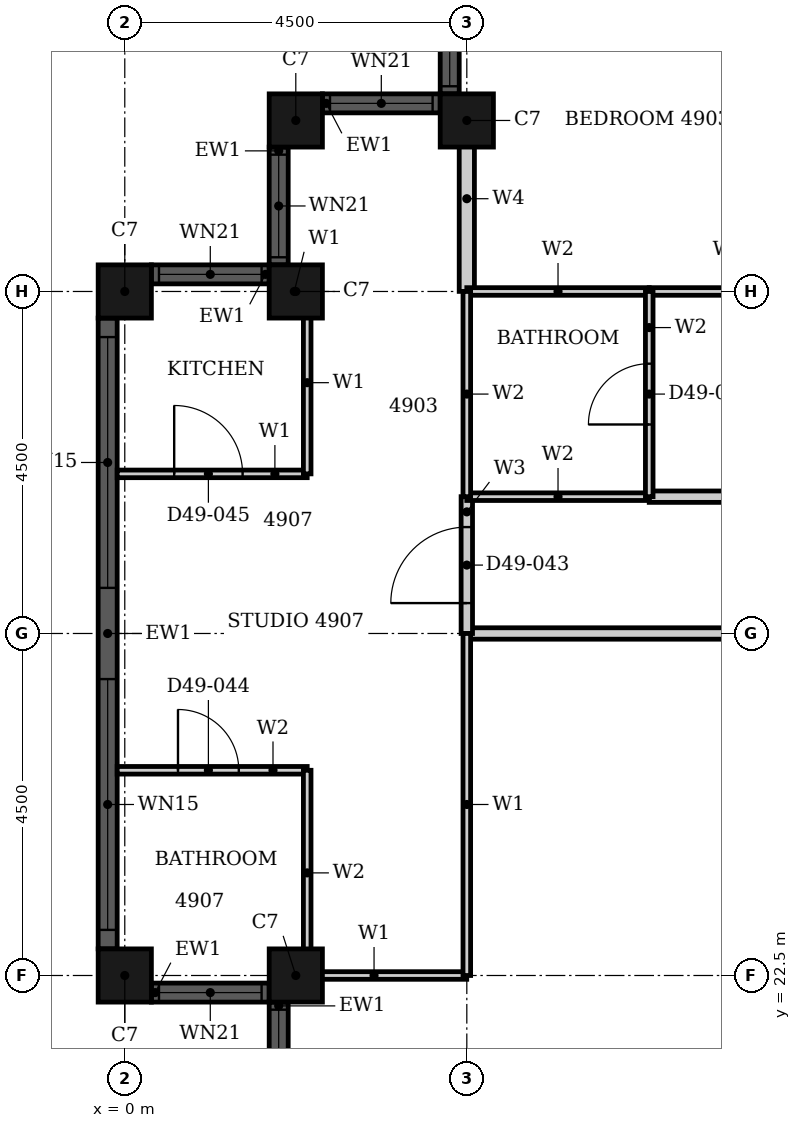
"""IFC4 building model, lengths in metres.
Left out: names, types, materials, properties, quantities, classifications, styles, units other than length and angle.
Written with IfcOpenShell. Run it as: python <this file> out.ifc"""

import sys

from ifc_helpers import new_model, si_unit, direction, frame, frame_2d, origin, origin_2d, place, context, subcontext, project, spatial, rectangle, hollow_rectangle, extrude, element, fill, save


model = new_model("IFC4")
c1 = context("Model", 3, precision=1e-05, world=origin(), true_north=direction((0.0, 1.0)))
c2 = subcontext(c1, "Body", "Model", "MODEL_VIEW")
j1 = project(units=[si_unit("LENGTHUNIT", "METRE"), si_unit("PLANEANGLEUNIT", "RADIAN")], contexts=[c1])
p1 = place(None, origin())
s1 = spatial("IfcSite", under=j1, at=p1, CompositionType="ELEMENT")
p2 = place(p1, origin())
s2 = spatial("IfcBuilding", under=s1, at=p2, CompositionType="ELEMENT")
p3 = place(p2, frame((0.0, 0.0, 196.1)))
s3 = spatial("IfcBuildingStorey", under=s2, at=p3, CompositionType="ELEMENT", Elevation=196.1)
for number, where, z_axis, x_axis in (
    (1, (4.5, 33.75, 0.0), (0.0, 0.0, 1.0), (1.0, 0.0, 0.0)),
    (2, (2.25, 33.75, 0.0), (0.0, 0.0, 1.0), (1.0, 0.0, 0.0)),
    (3, (2.25, 31.5, 0.0), (0.0, 0.0, 1.0), (1.0, 0.0, 0.0)),
    (4, (0.0, 31.5, 0.0), (0.0, 0.0, 1.0), (1.0, 0.0, 0.0)),
    (5, (0.0, 22.5, 0.0), (0.0, 0.0, 1.0), (1.0, 0.0, 0.0)),
    (6, (2.25, 22.5, 0.0), (0.0, 0.0, 1.0), (1.0, 0.0, 0.0)),
):
    element("IfcColumn", number, at=place(p3, frame(where, z_axis=z_axis, x_axis=x_axis)), inside=s3, PredefinedType="COLUMN", context=c2, shape_type="SweptSolid", body=[
        extrude(hollow_rectangle(XDim=0.7, YDim=0.7, WallThickness=0.022, at=origin_2d()), origin(), (0.0, 0.0, 1.0), 3.7),
    ])
p4 = place(p3, frame((4.275, 35.65, 0.0), z_axis=(0.0, 0.0, 1.0), x_axis=(0.0, -1.0, 0.0)))
e7 = element("IfcWall", 7, at=p4, inside=s3, PredefinedType="SOLIDWALL", context=c2, shape_type="SweptSolid", body=[
    extrude(rectangle(XDim=1.55, YDim=0.25, at=frame_2d((0.775, 0.0))), origin(), (0.0, 0.0, 1.0), 3.7),
])
p5 = place(p4, frame((0.1, 0.0, 0.9)))
e8 = element("IfcOpeningElement", 8, at=p5, cuts=e7, PredefinedType="OPENING", context=c2, shape_type="SweptSolid", body=[
    extrude(rectangle(XDim=1.35, YDim=1.85, at=frame_2d((0.675, 0.925))), frame((0.0, 0.135, 0.0), z_axis=(0.0, -1.0, 0.0), x_axis=(1.0, 0.0, 0.0)), (0.0, 0.0, 1.0), 0.27),
])
p6 = place(p3, frame((4.15, 33.975, 0.0), z_axis=(0.0, 0.0, 1.0), x_axis=(-1.0, 0.0, 0.0)))
e9 = element("IfcWall", 9, at=p6, inside=s3, PredefinedType="SOLIDWALL", context=c2, shape_type="SweptSolid", body=[
    extrude(rectangle(XDim=1.55, YDim=0.25, at=frame_2d((0.775, 0.0))), origin(), (0.0, 0.0, 1.0), 3.7),
])
p7 = place(p6, frame((0.1, 0.0, 0.9)))
e10 = element("IfcOpeningElement", 10, at=p7, cuts=e9, PredefinedType="OPENING", context=c2, shape_type="SweptSolid", body=[
    extrude(rectangle(XDim=1.35, YDim=1.85, at=frame_2d((0.675, 0.925))), frame((0.0, 0.135, 0.0), z_axis=(0.0, -1.0, 0.0), x_axis=(1.0, 0.0, 0.0)), (0.0, 0.0, 1.0), 0.27),
])
p8 = place(p3, frame((2.025, 33.4, 0.0), z_axis=(0.0, 0.0, 1.0), x_axis=(0.0, -1.0, 0.0)))
e11 = element("IfcWall", 11, at=p8, inside=s3, PredefinedType="SOLIDWALL", context=c2, shape_type="SweptSolid", body=[
    extrude(rectangle(XDim=1.55, YDim=0.25, at=frame_2d((0.775, 0.0))), origin(), (0.0, 0.0, 1.0), 3.7),
])
p9 = place(p8, frame((0.1, 0.0, 0.9)))
e12 = element("IfcOpeningElement", 12, at=p9, cuts=e11, PredefinedType="OPENING", context=c2, shape_type="SweptSolid", body=[
    extrude(rectangle(XDim=1.35, YDim=1.85, at=frame_2d((0.675, 0.925))), frame((0.0, 0.135, 0.0), z_axis=(0.0, -1.0, 0.0), x_axis=(1.0, 0.0, 0.0)), (0.0, 0.0, 1.0), 0.27),
])
p10 = place(p3, frame((1.9, 31.725, 0.0), z_axis=(0.0, 0.0, 1.0), x_axis=(-1.0, 0.0, 0.0)))
e13 = element("IfcWall", 13, at=p10, inside=s3, PredefinedType="SOLIDWALL", context=c2, shape_type="SweptSolid", body=[
    extrude(rectangle(XDim=1.55, YDim=0.25, at=frame_2d((0.775, 0.0))), origin(), (0.0, 0.0, 1.0), 3.7),
])
p11 = place(p10, frame((0.1, 0.0, 0.9)))
e14 = element("IfcOpeningElement", 14, at=p11, cuts=e13, PredefinedType="OPENING", context=c2, shape_type="SweptSolid", body=[
    extrude(rectangle(XDim=1.35, YDim=1.85, at=frame_2d((0.675, 0.925))), frame((0.0, 0.135, 0.0), z_axis=(0.0, -1.0, 0.0), x_axis=(1.0, 0.0, 0.0)), (0.0, 0.0, 1.0), 0.27),
])
p12 = place(p3, frame((-0.225, 31.15, 0.0), z_axis=(0.0, 0.0, 1.0), x_axis=(0.0, -1.0, 0.0)))
e15 = element("IfcWall", 15, at=p12, inside=s3, PredefinedType="SOLIDWALL", context=c2, shape_type="SweptSolid", body=[
    extrude(rectangle(XDim=8.3, YDim=0.25, at=frame_2d((4.15, 0.0))), origin(), (0.0, 0.0, 1.0), 3.7),
])
p13 = place(p12, frame((0.25, 0.0, 0.45)))
e16 = element("IfcOpeningElement", 16, at=p13, cuts=e15, PredefinedType="OPENING", context=c2, shape_type="SweptSolid", body=[
    extrude(rectangle(XDim=3.3, YDim=2.3, at=frame_2d((1.65, 1.15))), frame((0.0, 0.135, 0.0), z_axis=(0.0, -1.0, 0.0), x_axis=(1.0, 0.0, 0.0)), (0.0, 0.0, 1.0), 0.27),
])
p14 = place(p12, frame((4.75, 0.0, 0.45)))
e17 = element("IfcOpeningElement", 17, at=p14, cuts=e15, PredefinedType="OPENING", context=c2, shape_type="SweptSolid", body=[
    extrude(rectangle(XDim=3.3, YDim=2.3, at=frame_2d((1.65, 1.15))), frame((0.0, 0.135, 0.0), z_axis=(0.0, -1.0, 0.0), x_axis=(1.0, 0.0, 0.0)), (0.0, 0.0, 1.0), 0.27),
])
p15 = place(p3, frame((0.35, 22.275, 0.0), z_axis=(0.0, 0.0, 1.0), x_axis=(1.0, 0.0, 0.0)))
e18 = element("IfcWall", 18, at=p15, inside=s3, PredefinedType="SOLIDWALL", context=c2, shape_type="SweptSolid", body=[
    extrude(rectangle(XDim=1.55, YDim=0.25, at=frame_2d((0.775, 0.0))), origin(), (0.0, 0.0, 1.0), 3.7),
])
p16 = place(p15, frame((0.1, 0.0, 0.9)))
e19 = element("IfcOpeningElement", 19, at=p16, cuts=e18, PredefinedType="OPENING", context=c2, shape_type="SweptSolid", body=[
    extrude(rectangle(XDim=1.35, YDim=1.85, at=frame_2d((0.675, 0.925))), frame((0.0, 0.135, 0.0), z_axis=(0.0, -1.0, 0.0), x_axis=(1.0, 0.0, 0.0)), (0.0, 0.0, 1.0), 0.27),
])
p17 = place(p3, frame((2.025, 22.15, 0.0), z_axis=(0.0, 0.0, 1.0), x_axis=(0.0, -1.0, 0.0)))
e20 = element("IfcWall", 20, at=p17, inside=s3, PredefinedType="SOLIDWALL", context=c2, shape_type="SweptSolid", body=[
    extrude(rectangle(XDim=1.55, YDim=0.25, at=frame_2d((0.775, 0.0))), origin(), (0.0, 0.0, 1.0), 3.7),
])
p18 = place(p17, frame((0.1, 0.0, 0.9)))
e21 = element("IfcOpeningElement", 21, at=p18, cuts=e20, PredefinedType="OPENING", context=c2, shape_type="SweptSolid", body=[
    extrude(rectangle(XDim=1.35, YDim=1.85, at=frame_2d((0.675, 0.925))), frame((0.0, 0.135, 0.0), z_axis=(0.0, -1.0, 0.0), x_axis=(1.0, 0.0, 0.0)), (0.0, 0.0, 1.0), 0.27),
])
p19 = place(p3, frame((4.5, 27.0, 0.0), z_axis=(0.0, 0.0, 1.0), x_axis=(1.0, 0.0, 0.0)))
e22 = element("IfcWall", 22, at=p19, inside=s3, PredefinedType="PARTITIONING", context=c2, shape_type="SweptSolid", body=[
    extrude(rectangle(XDim=13.5, YDim=0.15, at=frame_2d((6.75, 0.0))), origin(), (0.0, 0.0, 1.0), 2.68),
])
p20 = place(p19, frame((5.35, 0.0, 0.0)))
e23 = element("IfcOpeningElement", 23, at=p20, cuts=e22, PredefinedType="OPENING", context=c2, shape_type="SweptSolid", body=[
    extrude(rectangle(XDim=1.0, YDim=2.1, at=frame_2d((0.5, 1.05))), frame((0.0, 0.085, 0.0), z_axis=(0.0, -1.0, 0.0), x_axis=(1.0, 0.0, 0.0)), (0.0, 0.0, 1.0), 0.17),
])
p21 = place(p3, frame((6.9, 28.8, 0.0), z_axis=(0.0, 0.0, 1.0), x_axis=(1.0, 0.0, 0.0)))
e24 = element("IfcWall", 24, at=p21, inside=s3, PredefinedType="PARTITIONING", context=c2, shape_type="SweptSolid", body=[
    extrude(rectangle(XDim=9.299, YDim=0.15, at=frame_2d((4.649, 0.0))), origin(), (0.0, 0.0, 1.0), 3.4),
])
p22 = place(p21, frame((1.3, 0.0, 0.0)))
e25 = element("IfcOpeningElement", 25, at=p22, cuts=e24, PredefinedType="OPENING", context=c2, shape_type="SweptSolid", body=[
    extrude(rectangle(XDim=1.0, YDim=2.2, at=frame_2d((0.5, 1.1))), frame((0.0, 0.085, 0.0), z_axis=(0.0, -1.0, 0.0), x_axis=(1.0, 0.0, 0.0)), (0.0, 0.0, 1.0), 0.17),
])
p23 = place(p3, frame((4.5, 27.0, 0.0), z_axis=(0.0, 0.0, 1.0), x_axis=(0.0, 1.0, 0.0)))
e26 = element("IfcWall", 26, at=p23, inside=s3, PredefinedType="PARTITIONING", context=c2, shape_type="SweptSolid", body=[
    extrude(rectangle(XDim=1.8, YDim=0.15, at=frame_2d((0.9, 0.0))), origin(), (0.0, 0.0, 1.0), 3.4),
])
p24 = place(p23, frame((0.4, 0.0, 0.0)))
e27 = element("IfcOpeningElement", 27, at=p24, cuts=e26, PredefinedType="OPENING", context=c2, shape_type="SweptSolid", body=[
    extrude(rectangle(XDim=1.0, YDim=2.2, at=frame_2d((0.5, 1.1))), frame((0.0, 0.085, 0.0), z_axis=(0.0, -1.0, 0.0), x_axis=(1.0, 0.0, 0.0)), (0.0, 0.0, 1.0), 0.17),
])
p25 = place(p3, frame((2.06, 22.5, 0.0), z_axis=(0.0, 0.0, 1.0), x_axis=(1.0, 0.0, 0.0)))
e28 = element("IfcWall", 28, at=p25, inside=s3, PredefinedType="PARTITIONING", context=c2, shape_type="SweptSolid", body=[
    extrude(rectangle(XDim=2.439, YDim=0.1, at=frame_2d((1.219, 0.0))), origin(), (0.0, 0.0, 1.0), 2.68),
])
p26 = place(p3, frame((-0.1, 29.1, 0.0), z_axis=(0.0, 0.0, 1.0), x_axis=(1.0, 0.0, 0.0)))
e29 = element("IfcWall", 29, at=p26, inside=s3, PredefinedType="PARTITIONING", context=c2, shape_type="SweptSolid", body=[
    extrude(rectangle(XDim=2.5, YDim=0.1, at=frame_2d((1.25, 0.0))), origin(), (0.0, 0.0, 1.0), 3.4),
])
p27 = place(p26, frame((0.75, 0.0, 0.0)))
e30 = element("IfcOpeningElement", 30, at=p27, cuts=e29, PredefinedType="OPENING", context=c2, shape_type="SweptSolid", body=[
    extrude(rectangle(XDim=0.9, YDim=2.1, at=frame_2d((0.45, 1.05))), frame((0.0, 0.06, 0.0), z_axis=(0.0, -1.0, 0.0), x_axis=(1.0, 0.0, 0.0)), (0.0, 0.0, 1.0), 0.12),
])
p28 = place(p3, frame((6.9, 31.5, 0.0), z_axis=(0.0, 0.0, 1.0), x_axis=(1.0, 0.0, 0.0)))
e31 = element("IfcWall", 31, at=p28, inside=s3, PredefinedType="PARTITIONING", context=c2, shape_type="SweptSolid", body=[
    extrude(rectangle(XDim=2.1, YDim=0.1, at=frame_2d((1.05, 0.0))), origin(), (0.0, 0.0, 1.0), 2.68),
])
p29 = place(p3, frame((2.06, 31.5, 0.0), z_axis=(0.0, 0.0, 1.0), x_axis=(1.0, 0.0, 0.0)))
e32 = element("IfcWall", 32, at=p29, inside=s3, PredefinedType="PARTITIONING", context=c2, shape_type="SweptSolid", body=[
    extrude(rectangle(XDim=0.34, YDim=0.1, at=frame_2d((0.17, 0.0))), origin(), (0.0, 0.0, 1.0), 3.4),
])
p30 = place(p3, frame((2.4, 29.1, 0.0), z_axis=(0.0, 0.0, 1.0), x_axis=(0.0, 1.0, 0.0)))
e33 = element("IfcWall", 33, at=p30, inside=s3, PredefinedType="PARTITIONING", context=c2, shape_type="SweptSolid", body=[
    extrude(rectangle(XDim=2.4, YDim=0.1, at=frame_2d((1.2, 0.0))), origin(), (0.0, 0.0, 1.0), 3.4),
])
p31 = place(p3, frame((4.5, 22.5, 0.0), z_axis=(0.0, 0.0, 1.0), x_axis=(0.0, 1.0, 0.0)))
e34 = element("IfcWall", 34, at=p31, inside=s3, PredefinedType="PARTITIONING", context=c2, shape_type="SweptSolid", body=[
    extrude(rectangle(XDim=4.5, YDim=0.1, at=frame_2d((2.25, 0.0))), origin(), (0.0, 0.0, 1.0), 3.4),
])
p32 = place(p3, frame((4.5, 31.501, 0.0), z_axis=(0.0, 0.0, 1.0), x_axis=(0.0, 1.0, 0.0)))
e35 = element("IfcWall", 35, at=p32, inside=s3, PredefinedType="PARTITIONING", context=c2, shape_type="SweptSolid", body=[
    extrude(rectangle(XDim=2.439, YDim=0.2, at=frame_2d((1.219, 0.0))), origin(), (0.0, 0.0, 1.0), 3.4),
])
p33 = place(p3, frame((-0.1, 25.2, 0.0), z_axis=(0.0, 0.0, 1.0), x_axis=(1.0, 0.0, 0.0)))
e36 = element("IfcWall", 36, at=p33, inside=s3, PredefinedType="PARTITIONING", context=c2, shape_type="SweptSolid", body=[
    extrude(rectangle(XDim=2.5, YDim=0.1, at=frame_2d((1.25, 0.0))), origin(), (0.0, 0.0, 1.0), 3.4),
])
p34 = place(p33, frame((0.8, 0.0, 0.0)))
e37 = element("IfcOpeningElement", 37, at=p34, cuts=e36, PredefinedType="OPENING", context=c2, shape_type="SweptSolid", body=[
    extrude(rectangle(XDim=0.8, YDim=2.1, at=frame_2d((0.4, 1.05))), frame((0.0, 0.06, 0.0), z_axis=(0.0, -1.0, 0.0), x_axis=(1.0, 0.0, 0.0)), (0.0, 0.0, 1.0), 0.12),
])
p35 = place(p3, frame((4.5, 28.8, 0.0), z_axis=(0.0, 0.0, 1.0), x_axis=(1.0, 0.0, 0.0)))
e38 = element("IfcWall", 38, at=p35, inside=s3, PredefinedType="PARTITIONING", context=c2, shape_type="SweptSolid", body=[
    extrude(rectangle(XDim=2.4, YDim=0.1, at=frame_2d((1.2, 0.0))), origin(), (0.0, 0.0, 1.0), 3.4),
])
p36 = place(p3, frame((4.5, 31.5, 0.0), z_axis=(0.0, 0.0, 1.0), x_axis=(1.0, 0.0, 0.0)))
e39 = element("IfcWall", 39, at=p36, inside=s3, PredefinedType="PARTITIONING", context=c2, shape_type="SweptSolid", body=[
    extrude(rectangle(XDim=2.4, YDim=0.1, at=frame_2d((1.2, 0.0))), origin(), (0.0, 0.0, 1.0), 2.68),
])
for number, where, z_axis, x_axis in (
    (40, (2.4, 22.5, 0.0), (0.0, 0.0, 1.0), (0.0, 1.0, 0.0)),
    (41, (4.5, 28.8, 0.0), (0.0, 0.0, 1.0), (0.0, 1.0, 0.0)),
):
    element("IfcWall", number, at=place(p3, frame(where, z_axis=z_axis, x_axis=x_axis)), inside=s3, PredefinedType="PARTITIONING", context=c2, shape_type="SweptSolid", body=[
        extrude(rectangle(XDim=2.7, YDim=0.1, at=frame_2d((1.35, 0.0))), origin(), (0.0, 0.0, 1.0), 3.4),
    ])
p37 = place(p3, frame((6.9, 28.8, 0.0), z_axis=(0.0, 0.0, 1.0), x_axis=(0.0, 1.0, 0.0)))
e42 = element("IfcWall", 42, at=p37, inside=s3, PredefinedType="PARTITIONING", context=c2, shape_type="SweptSolid", body=[
    extrude(rectangle(XDim=2.7, YDim=0.1, at=frame_2d((1.35, 0.0))), origin(), (0.0, 0.0, 1.0), 3.4),
])
p38 = place(p37, frame((0.95, 0.0, 0.0)))
e43 = element("IfcOpeningElement", 43, at=p38, cuts=e42, PredefinedType="OPENING", context=c2, shape_type="SweptSolid", body=[
    extrude(rectangle(XDim=0.8, YDim=2.1, at=frame_2d((0.4, 1.05))), frame((0.0, 0.06, 0.0), z_axis=(0.0, -1.0, 0.0), x_axis=(1.0, 0.0, 0.0)), (0.0, 0.0, 1.0), 0.12),
])
p39 = place(p5, origin())
e44 = element("IfcWindow", 44, at=p39, inside=s3, PartitioningType="SINGLE_PANEL", PredefinedType="WINDOW", context=c2, shape_type="SweptSolid", body=[
    extrude(rectangle(XDim=1.35, YDim=1.85, at=frame_2d((0.675, 0.925))), frame((0.0, 0.03, 0.0), z_axis=(0.0, -1.0, 0.0), x_axis=(1.0, 0.0, 0.0)), (0.0, 0.0, 1.0), 0.06),
])
fill(e8, e44)
p40 = place(p7, origin())
e45 = element("IfcWindow", 45, at=p40, inside=s3, PartitioningType="SINGLE_PANEL", PredefinedType="WINDOW", context=c2, shape_type="SweptSolid", body=[
    extrude(rectangle(XDim=1.35, YDim=1.85, at=frame_2d((0.675, 0.925))), frame((0.0, 0.03, 0.0), z_axis=(0.0, -1.0, 0.0), x_axis=(1.0, 0.0, 0.0)), (0.0, 0.0, 1.0), 0.06),
])
fill(e10, e45)
p41 = place(p9, origin())
e46 = element("IfcWindow", 46, at=p41, inside=s3, PartitioningType="SINGLE_PANEL", PredefinedType="WINDOW", context=c2, shape_type="SweptSolid", body=[
    extrude(rectangle(XDim=1.35, YDim=1.85, at=frame_2d((0.675, 0.925))), frame((0.0, 0.03, 0.0), z_axis=(0.0, -1.0, 0.0), x_axis=(1.0, 0.0, 0.0)), (0.0, 0.0, 1.0), 0.06),
])
fill(e12, e46)
p42 = place(p11, origin())
e47 = element("IfcWindow", 47, at=p42, inside=s3, PartitioningType="SINGLE_PANEL", PredefinedType="WINDOW", context=c2, shape_type="SweptSolid", body=[
    extrude(rectangle(XDim=1.35, YDim=1.85, at=frame_2d((0.675, 0.925))), frame((0.0, 0.03, 0.0), z_axis=(0.0, -1.0, 0.0), x_axis=(1.0, 0.0, 0.0)), (0.0, 0.0, 1.0), 0.06),
])
fill(e14, e47)
p43 = place(p13, origin())
e48 = element("IfcWindow", 48, at=p43, inside=s3, PartitioningType="SINGLE_PANEL", PredefinedType="WINDOW", context=c2, shape_type="SweptSolid", body=[
    extrude(rectangle(XDim=3.3, YDim=2.3, at=frame_2d((1.65, 1.15))), frame((0.0, 0.03, 0.0), z_axis=(0.0, -1.0, 0.0), x_axis=(1.0, 0.0, 0.0)), (0.0, 0.0, 1.0), 0.06),
])
fill(e16, e48)
p44 = place(p14, origin())
e49 = element("IfcWindow", 49, at=p44, inside=s3, PartitioningType="SINGLE_PANEL", PredefinedType="WINDOW", context=c2, shape_type="SweptSolid", body=[
    extrude(rectangle(XDim=3.3, YDim=2.3, at=frame_2d((1.65, 1.15))), frame((0.0, 0.03, 0.0), z_axis=(0.0, -1.0, 0.0), x_axis=(1.0, 0.0, 0.0)), (0.0, 0.0, 1.0), 0.06),
])
fill(e17, e49)
p45 = place(p16, origin())
e50 = element("IfcWindow", 50, at=p45, inside=s3, PartitioningType="SINGLE_PANEL", PredefinedType="WINDOW", context=c2, shape_type="SweptSolid", body=[
    extrude(rectangle(XDim=1.35, YDim=1.85, at=frame_2d((0.675, 0.925))), frame((0.0, 0.03, 0.0), z_axis=(0.0, -1.0, 0.0), x_axis=(1.0, 0.0, 0.0)), (0.0, 0.0, 1.0), 0.06),
])
fill(e19, e50)
p46 = place(p18, origin())
e51 = element("IfcWindow", 51, at=p46, inside=s3, PartitioningType="SINGLE_PANEL", PredefinedType="WINDOW", context=c2, shape_type="SweptSolid", body=[
    extrude(rectangle(XDim=1.35, YDim=1.85, at=frame_2d((0.675, 0.925))), frame((0.0, 0.03, 0.0), z_axis=(0.0, -1.0, 0.0), x_axis=(1.0, 0.0, 0.0)), (0.0, 0.0, 1.0), 0.06),
])
fill(e21, e51)
p47 = place(p38, origin())
e52 = element("IfcDoor", 52, at=p47, inside=s3, OperationType="SINGLE_SWING_LEFT", PredefinedType="DOOR", context=c2, shape_type="SweptSolid", body=[
    extrude(rectangle(XDim=0.8, YDim=2.1, at=frame_2d((0.4, 1.05))), frame((0.0, 0.025, 0.0), z_axis=(0.0, -1.0, 0.0), x_axis=(1.0, 0.0, 0.0)), (0.0, 0.0, 1.0), 0.05),
])
fill(e43, e52)
p48 = place(p24, origin())
e53 = element("IfcDoor", 53, at=p48, inside=s3, OperationType="SINGLE_SWING_RIGHT", PredefinedType="DOOR", context=c2, shape_type="SweptSolid", body=[
    extrude(rectangle(XDim=1.0, YDim=2.2, at=frame_2d((0.5, 1.1))), frame((0.0, 0.025, 0.0), z_axis=(0.0, -1.0, 0.0), x_axis=(1.0, 0.0, 0.0)), (0.0, 0.0, 1.0), 0.05),
])
fill(e27, e53)
p49 = place(p34, origin())
e54 = element("IfcDoor", 54, at=p49, inside=s3, OperationType="SINGLE_SWING_RIGHT", PredefinedType="DOOR", context=c2, shape_type="SweptSolid", body=[
    extrude(rectangle(XDim=0.8, YDim=2.1, at=frame_2d((0.4, 1.05))), frame((0.0, 0.025, 0.0), z_axis=(0.0, -1.0, 0.0), x_axis=(1.0, 0.0, 0.0)), (0.0, 0.0, 1.0), 0.05),
])
fill(e37, e54)
p50 = place(p27, origin())
e55 = element("IfcDoor", 55, at=p50, inside=s3, OperationType="SINGLE_SWING_LEFT", PredefinedType="DOOR", context=c2, shape_type="SweptSolid", body=[
    extrude(rectangle(XDim=0.9, YDim=2.1, at=frame_2d((0.45, 1.05))), frame((0.0, 0.025, 0.0), z_axis=(0.0, -1.0, 0.0), x_axis=(1.0, 0.0, 0.0)), (0.0, 0.0, 1.0), 0.05),
])
fill(e30, e55)
save(model, sys.argv[1])
